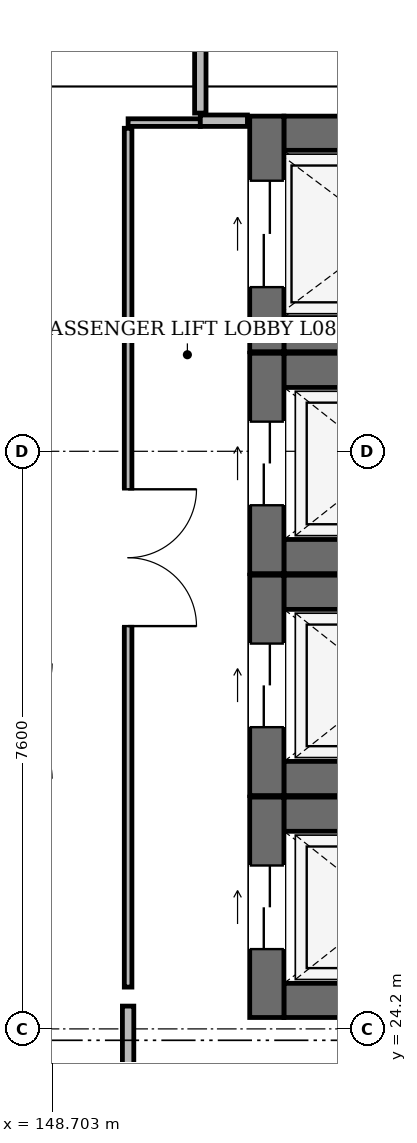
"""IFC4 building model, lengths in metres.
Left out: names, types, materials, properties, quantities, classifications, styles, units other than length and angle.
Written with IfcOpenShell. Run it as: python <this file> out.ifc"""

import sys

from ifc_helpers import new_model, si_unit, direction, frame, frame_2d, origin, place, context, subcontext, project, spatial, rectangle, extrude, element, fill, save


model = new_model("IFC4")
c1 = context("Model", 3, precision=1e-05, world=origin(), true_north=direction((0.0, 1.0)))
c2 = subcontext(c1, "Body", "Model", "MODEL_VIEW")
j1 = project(units=[si_unit("LENGTHUNIT", "METRE"), si_unit("PLANEANGLEUNIT", "RADIAN")], contexts=[c1])
p1 = place(None, origin())
s1 = spatial("IfcSite", under=j1, at=p1, CompositionType="ELEMENT")
p2 = place(p1, origin())
s2 = spatial("IfcBuilding", under=s1, at=p2, CompositionType="ELEMENT")
p3 = place(p2, frame((0.0, 0.0, 36.6)))
s3 = spatial("IfcBuildingStorey", under=s2, at=p3, CompositionType="ELEMENT", Elevation=36.6)
for number, where, z_axis, x_axis in (
    (1, (151.75, 24.575, 0.0), (0.0, 0.0, 1.0), (1.0, 0.0, 0.0)),
    (2, (151.75, 27.025, 0.0), (0.0, 0.0, 1.0), (1.0, 0.0, 0.0)),
):
    element("IfcWall", number, at=place(p3, frame(where, z_axis=z_axis, x_axis=x_axis)), inside=s3, PredefinedType="SHEAR", context=c2, shape_type="SweptSolid", body=[
        extrude(rectangle(XDim=2.7, YDim=0.45, at=frame_2d((1.35, 0.0))), origin(), (0.0, 0.0, 1.0), 3.95),
    ])
p4 = place(p3, frame((151.525, 24.35, 0.0), z_axis=(0.0, 0.0, 1.0), x_axis=(0.0, 1.0, 0.0)))
e3 = element("IfcWall", 3, at=p4, inside=s3, PredefinedType="SHEAR", context=c2, shape_type="SweptSolid", body=[
    extrude(rectangle(XDim=2.9, YDim=0.45, at=frame_2d((1.45, 0.0))), origin(), (0.0, 0.0, 1.0), 3.95),
])
p5 = place(p4, frame((0.9, 0.0, 0.0)))
e4 = element("IfcOpeningElement", 4, at=p5, cuts=e3, PredefinedType="OPENING", context=c2, shape_type="SweptSolid", body=[
    extrude(rectangle(XDim=1.1, YDim=2.2, at=frame_2d((0.55, 1.1))), frame((0.0, 0.237, 0.0), z_axis=(0.0, -1.0, 0.0), x_axis=(1.0, 0.0, 0.0)), (0.0, 0.0, 1.0), 0.474),
])
for number, where, z_axis, x_axis in (
    (5, (151.75, 27.495, 0.0), (0.0, 0.0, 1.0), (1.0, 0.0, 0.0)),
    (6, (151.75, 29.945, 0.0), (0.0, 0.0, 1.0), (1.0, 0.0, 0.0)),
):
    element("IfcWall", number, at=place(p3, frame(where, z_axis=z_axis, x_axis=x_axis)), inside=s3, PredefinedType="SHEAR", context=c2, shape_type="SweptSolid", body=[
        extrude(rectangle(XDim=2.7, YDim=0.45, at=frame_2d((1.35, 0.0))), origin(), (0.0, 0.0, 1.0), 3.95),
    ])
p6 = place(p3, frame((151.525, 27.27, 0.0), z_axis=(0.0, 0.0, 1.0), x_axis=(0.0, 1.0, 0.0)))
e7 = element("IfcWall", 7, at=p6, inside=s3, PredefinedType="SHEAR", context=c2, shape_type="SweptSolid", body=[
    extrude(rectangle(XDim=2.9, YDim=0.45, at=frame_2d((1.45, 0.0))), origin(), (0.0, 0.0, 1.0), 3.95),
])
p7 = place(p6, frame((0.9, 0.0, 0.0)))
e8 = element("IfcOpeningElement", 8, at=p7, cuts=e7, PredefinedType="OPENING", context=c2, shape_type="SweptSolid", body=[
    extrude(rectangle(XDim=1.1, YDim=2.2, at=frame_2d((0.55, 1.1))), frame((0.0, 0.237, 0.0), z_axis=(0.0, -1.0, 0.0), x_axis=(1.0, 0.0, 0.0)), (0.0, 0.0, 1.0), 0.474),
])
for number, where, z_axis, x_axis in (
    (9, (151.75, 30.415, 0.0), (0.0, 0.0, 1.0), (1.0, 0.0, 0.0)),
    (10, (151.75, 32.865, 0.0), (0.0, 0.0, 1.0), (1.0, 0.0, 0.0)),
):
    element("IfcWall", number, at=place(p3, frame(where, z_axis=z_axis, x_axis=x_axis)), inside=s3, PredefinedType="SHEAR", context=c2, shape_type="SweptSolid", body=[
        extrude(rectangle(XDim=2.7, YDim=0.45, at=frame_2d((1.35, 0.0))), origin(), (0.0, 0.0, 1.0), 3.95),
    ])
p8 = place(p3, frame((151.525, 30.19, 0.0), z_axis=(0.0, 0.0, 1.0), x_axis=(0.0, 1.0, 0.0)))
e11 = element("IfcWall", 11, at=p8, inside=s3, PredefinedType="SHEAR", context=c2, shape_type="SweptSolid", body=[
    extrude(rectangle(XDim=2.9, YDim=0.45, at=frame_2d((1.45, 0.0))), origin(), (0.0, 0.0, 1.0), 3.95),
])
p9 = place(p8, frame((0.9, 0.0, 0.0)))
e12 = element("IfcOpeningElement", 12, at=p9, cuts=e11, PredefinedType="OPENING", context=c2, shape_type="SweptSolid", body=[
    extrude(rectangle(XDim=1.1, YDim=2.2, at=frame_2d((0.55, 1.1))), frame((0.0, 0.237, 0.0), z_axis=(0.0, -1.0, 0.0), x_axis=(1.0, 0.0, 0.0)), (0.0, 0.0, 1.0), 0.474),
])
for number, where, z_axis, x_axis in (
    (13, (151.75, 33.335, 0.0), (0.0, 0.0, 1.0), (1.0, 0.0, 0.0)),
    (14, (151.75, 35.985, 0.0), (0.0, 0.0, 1.0), (1.0, 0.0, 0.0)),
):
    element("IfcWall", number, at=place(p3, frame(where, z_axis=z_axis, x_axis=x_axis)), inside=s3, PredefinedType="SHEAR", context=c2, shape_type="SweptSolid", body=[
        extrude(rectangle(XDim=2.7, YDim=0.45, at=frame_2d((1.35, 0.0))), origin(), (0.0, 0.0, 1.0), 3.95),
    ])
p10 = place(p3, frame((151.525, 33.11, 0.0), z_axis=(0.0, 0.0, 1.0), x_axis=(0.0, 1.0, 0.0)))
e15 = element("IfcWall", 15, at=p10, inside=s3, PredefinedType="SHEAR", context=c2, shape_type="SweptSolid", body=[
    extrude(rectangle(XDim=3.1, YDim=0.45, at=frame_2d((1.55, 0.0))), origin(), (0.0, 0.0, 1.0), 3.95),
])
p11 = place(p10, frame((0.85, 0.0, 0.0)))
e16 = element("IfcOpeningElement", 16, at=p11, cuts=e15, PredefinedType="OPENING", context=c2, shape_type="SweptSolid", body=[
    extrude(rectangle(XDim=1.4, YDim=2.3, at=frame_2d((0.7, 1.15))), frame((0.0, 0.237, 0.0), z_axis=(0.0, -1.0, 0.0), x_axis=(1.0, 0.0, 0.0)), (0.0, 0.0, 1.0), 0.474),
])
p12 = place(p3, frame((149.7, 24.75, 0.0), z_axis=(0.0, 0.0, 1.0), x_axis=(0.0, 1.0, 0.0)))
e17 = element("IfcWall", 17, at=p12, inside=s3, PredefinedType="PARTITIONING", context=c2, shape_type="SweptSolid", body=[
    extrude(rectangle(XDim=11.3, YDim=0.1, at=frame_2d((5.65, 0.0))), origin(), (0.0, 0.0, 1.0), 3.805),
])
p13 = place(p12, frame((4.75, 0.0, 0.0)))
e18 = element("IfcOpeningElement", 18, at=p13, cuts=e17, PredefinedType="OPENING", context=c2, shape_type="SweptSolid", body=[
    extrude(rectangle(XDim=1.8, YDim=2.4, at=frame_2d((0.9, 1.2))), frame((0.0, 0.062, 0.0), z_axis=(0.0, -1.0, 0.0), x_axis=(1.0, 0.0, 0.0)), (0.0, 0.0, 1.0), 0.124),
])
p14 = place(p3, frame((149.7, 36.125, 0.0), z_axis=(0.0, 0.0, 1.0), x_axis=(1.0, 0.0, 0.0)))
e19 = element("IfcWall", 19, at=p14, inside=s3, PredefinedType="PARTITIONING", context=c2, shape_type="SweptSolid", body=[
    extrude(rectangle(XDim=0.95, YDim=0.1, at=frame_2d((0.475, 0.0))), origin(), (0.0, 0.0, 1.0), 3.805),
])
p15 = place(p3, frame((150.65, 36.15, 0.0), z_axis=(0.0, 0.0, 1.0), x_axis=(1.0, 0.0, 0.0)))
e20 = element("IfcWall", 20, at=p15, inside=s3, PredefinedType="PARTITIONING", context=c2, shape_type="SweptSolid", body=[
    extrude(rectangle(XDim=0.62, YDim=0.15, at=frame_2d((0.31, 0.0))), origin(), (0.0, 0.0, 1.0), 3.805),
])
p16 = place(p3, frame((149.7, 24.5, 0.0), z_axis=(0.0, 0.0, 1.0), x_axis=(0.0, -1.0, 0.0)))
e21 = element("IfcWall", 21, at=p16, inside=s3, PredefinedType="PARTITIONING", context=c2, shape_type="SweptSolid", body=[
    extrude(rectangle(XDim=0.8, YDim=0.15, at=frame_2d((0.4, 0.0))), origin(), (0.0, 0.0, 1.0), 3.805),
])
p17 = place(p3, frame((150.65, 54.6, 0.0), z_axis=(0.0, 0.0, 1.0), x_axis=(0.0, -1.0, 0.0)))
e22 = element("IfcWall", 22, at=p17, inside=s3, PredefinedType="PARTITIONING", context=c2, shape_type="SweptSolid", body=[
    extrude(rectangle(XDim=18.35, YDim=0.15, at=frame_2d((9.175, 0.0))), origin(), (0.0, 0.0, 1.0), 3.805),
])
p18 = place(p17, frame((8.475, 0.0, 0.0)))
e23 = element("IfcOpeningElement", 23, at=p18, cuts=e22, PredefinedType="OPENING", context=c2, shape_type="SweptSolid", body=[
    extrude(rectangle(XDim=1.4, YDim=2.2, at=frame_2d((0.7, 1.1))), frame((0.0, 0.087, 0.0), z_axis=(0.0, -1.0, 0.0), x_axis=(1.0, 0.0, 0.0)), (0.0, 0.0, 1.0), 0.174),
])
p19 = place(p5, origin())
e24 = element("IfcDoor", 24, at=p19, inside=s3, OperationType="DOUBLE_DOOR_SLIDING", PredefinedType="DOOR", context=c2, shape_type="SweptSolid", body=[
    extrude(rectangle(XDim=1.1, YDim=2.2, at=frame_2d((0.55, 1.1))), frame((0.0, 0.025, 0.0), z_axis=(0.0, -1.0, 0.0), x_axis=(1.0, 0.0, 0.0)), (0.0, 0.0, 1.0), 0.05),
])
fill(e4, e24)
p20 = place(p7, origin())
e25 = element("IfcDoor", 25, at=p20, inside=s3, OperationType="DOUBLE_DOOR_SLIDING", PredefinedType="DOOR", context=c2, shape_type="SweptSolid", body=[
    extrude(rectangle(XDim=1.1, YDim=2.2, at=frame_2d((0.55, 1.1))), frame((0.0, 0.025, 0.0), z_axis=(0.0, -1.0, 0.0), x_axis=(1.0, 0.0, 0.0)), (0.0, 0.0, 1.0), 0.05),
])
fill(e8, e25)
p21 = place(p9, origin())
e26 = element("IfcDoor", 26, at=p21, inside=s3, OperationType="DOUBLE_DOOR_SLIDING", PredefinedType="DOOR", context=c2, shape_type="SweptSolid", body=[
    extrude(rectangle(XDim=1.1, YDim=2.2, at=frame_2d((0.55, 1.1))), frame((0.0, 0.025, 0.0), z_axis=(0.0, -1.0, 0.0), x_axis=(1.0, 0.0, 0.0)), (0.0, 0.0, 1.0), 0.05),
])
fill(e12, e26)
p22 = place(p11, origin())
e27 = element("IfcDoor", 27, at=p22, inside=s3, OperationType="DOUBLE_DOOR_SLIDING", PredefinedType="DOOR", context=c2, shape_type="SweptSolid", body=[
    extrude(rectangle(XDim=1.4, YDim=2.3, at=frame_2d((0.7, 1.15))), frame((0.0, 0.025, 0.0), z_axis=(0.0, -1.0, 0.0), x_axis=(1.0, 0.0, 0.0)), (0.0, 0.0, 1.0), 0.05),
])
fill(e16, e27)
p23 = place(p13, frame((1.8, 0.0, 0.0), z_axis=(0.0, 0.0, 1.0), x_axis=(-1.0, 0.0, 0.0)))
e28 = element("IfcDoor", 28, at=p23, inside=s3, OperationType="DOUBLE_DOOR_SINGLE_SWING", PredefinedType="DOOR", context=c2, shape_type="SweptSolid", body=[
    extrude(rectangle(XDim=1.8, YDim=2.4, at=frame_2d((0.9, 1.2))), frame((0.0, 0.025, 0.0), z_axis=(0.0, -1.0, 0.0), x_axis=(1.0, 0.0, 0.0)), (0.0, 0.0, 1.0), 0.05),
])
fill(e18, e28)
save(model, sys.argv[1])
